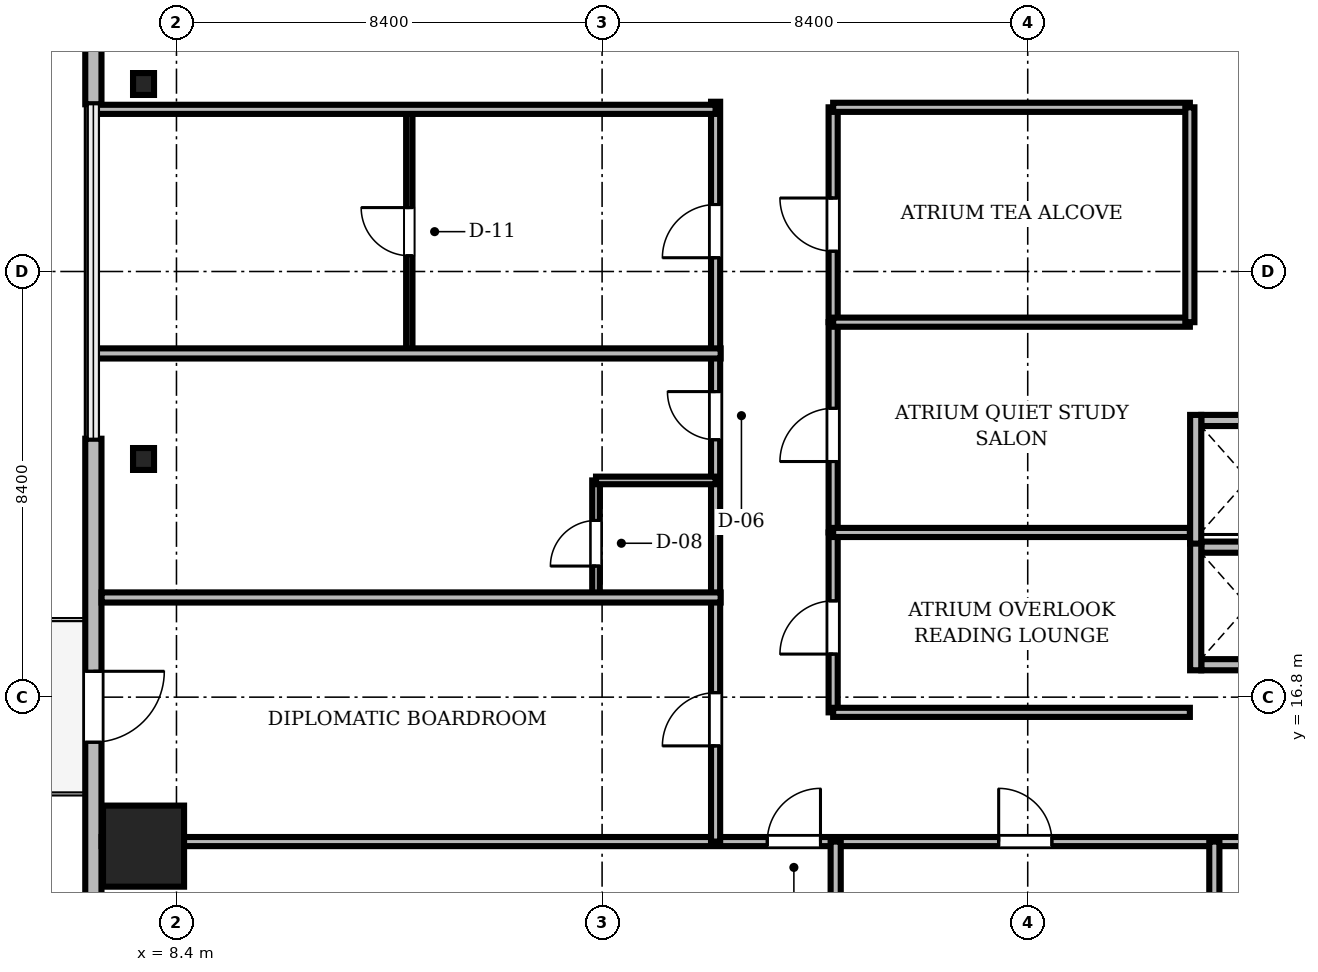
"""IFC4 building model, lengths in metres.
Left out: names, types, materials, properties, quantities, classifications, styles, units other than length and angle.
Written with IfcOpenShell. Run it as: python <this file> out.ifc"""

import sys

from ifc_helpers import new_model, si_unit, direction, frame, frame_2d, origin, origin_2d, place, context, subcontext, project, spatial, rectangle, i_section, extrude, source, transform, mapped, element, fill, save


model = new_model("IFC4")
c1 = context("Model", 3, precision=1e-05, world=origin(), true_north=direction((0.0, 1.0)))
c2 = subcontext(c1, "Body", "Model", "MODEL_VIEW")
j1 = project(units=[si_unit("LENGTHUNIT", "METRE"), si_unit("PLANEANGLEUNIT", "RADIAN")], contexts=[c1])
p1 = place(None, origin())
s1 = spatial("IfcSite", under=j1, at=p1, CompositionType="ELEMENT")
p2 = place(p1, origin())
s2 = spatial("IfcBuilding", under=s1, at=p2, CompositionType="ELEMENT")
p3 = place(p2, frame((0.0, 0.0, 115.0)))
s3 = spatial("IfcBuildingStorey", under=s2, at=p3, CompositionType="ELEMENT", Elevation=115.0)
m1 = source(origin(), c2, "Body", "SweptSolid", [
    extrude(rectangle(XDim=1.6, YDim=1.6, at=origin_2d()), origin(), (0.0, 0.0, 1.0), 3.46),
])
p4 = place(p3, frame((7.75, 13.86, 0.0), z_axis=(0.0, 0.0, 1.0), x_axis=(1.0, 0.0, 0.0)))
e1 = element("IfcColumn", 1, at=p4, inside=s3, PredefinedType="COLUMN", context=c2, shape_type="MappedRepresentation", body=[
    mapped(m1, transform((0.0, 0.0, 0.0), scale=1.0)),
])
m2 = source(origin(), c2, "Body", "SweptSolid", [
    extrude(i_section(OverallWidth=0.414, OverallDepth=0.432, WebThickness=0.026, FlangeThickness=0.04, FilletRadius=0.015, at=origin_2d()), origin(), (0.0, 0.0, 1.0), 3.46),
])
for number, where, z_axis, x_axis in (
    (2, (7.75, 28.9, 0.0), (0.0, 0.0, 1.0), (1.0, 0.0, 0.0)),
    (3, (7.75, 21.5, 0.0), (0.0, 0.0, 1.0), (1.0, 0.0, 0.0)),
):
    element("IfcColumn", number, at=place(p3, frame(where, z_axis=z_axis, x_axis=x_axis)), inside=s3, PredefinedType="COLUMN", context=c2, shape_type="MappedRepresentation", body=[
        mapped(m2, transform((0.0, 0.0, 0.0), scale=1.0)),
    ])
m3 = source(origin(), c2, "Body", "SweptSolid", [
    extrude(rectangle(XDim=15.6, YDim=0.32, at=frame_2d((7.8, 0.0))), origin(), (0.0, 0.0, 1.0), 3.46),
])
p5 = place(p3, frame((6.76, 44.1, 0.0), z_axis=(0.0, 0.0, 1.0), x_axis=(0.0, -1.0, 0.0)))
e4 = element("IfcWall", 4, at=p5, inside=s3, PredefinedType="SOLIDWALL", context=c2, shape_type="MappedRepresentation", body=[
    mapped(m3, transform((0.0, 0.0, 0.0), scale=1.0)),
])
m4 = source(origin(), c2, "Body", "SweptSolid", [
    extrude(rectangle(XDim=2.2, YDim=2.4, at=frame_2d((1.1, 1.2))), frame((0.0, 0.17, 0.0), z_axis=(0.0, -1.0, 0.0), x_axis=(1.0, 0.0, 0.0)), (0.0, 0.0, 1.0), 0.34),
])
p6 = place(p5, frame((3.005, 0.0, 0.72)))
e5 = element("IfcOpeningElement", 5, at=p6, cuts=e4, PredefinedType="OPENING", context=c2, shape_type="MappedRepresentation", body=[
    mapped(m4, transform((0.0, 0.0, 0.0), scale=1.0)),
])
m5 = source(origin(), c2, "Body", "SweptSolid", [
    extrude(rectangle(XDim=15.6, YDim=0.32, at=frame_2d((7.8, 0.0))), origin(), (0.0, 0.0, 1.0), 3.46),
])
p7 = place(p3, frame((6.76, 21.9, 0.0), z_axis=(0.0, 0.0, 1.0), x_axis=(0.0, -1.0, 0.0)))
e6 = element("IfcWall", 6, at=p7, inside=s3, PredefinedType="SOLIDWALL", context=c2, shape_type="MappedRepresentation", body=[
    mapped(m5, transform((0.0, 0.0, 0.0), scale=1.0)),
])
m6 = source(origin(), c2, "Body", "SweptSolid", [
    extrude(rectangle(XDim=1.4, YDim=2.3, at=frame_2d((0.7, 1.15))), frame((0.0, 0.17, 0.0), z_axis=(0.0, -1.0, 0.0), x_axis=(1.0, 0.0, 0.0)), (0.0, 0.0, 1.0), 0.34),
])
p8 = place(p7, frame((4.59, 0.0, 0.0)))
e7 = element("IfcOpeningElement", 7, at=p8, cuts=e6, PredefinedType="OPENING", context=c2, shape_type="MappedRepresentation", body=[
    mapped(m6, transform((0.0, 0.0, 0.0), scale=1.0)),
])
p9 = place(p7, frame((10.395, 0.0, 0.72)))
e8 = element("IfcOpeningElement", 8, at=p9, cuts=e6, PredefinedType="OPENING", context=c2, shape_type="MappedRepresentation", body=[
    mapped(m4, transform((0.0, 0.0, 0.0), scale=1.0)),
])
m7 = source(origin(), c2, "Body", "SweptSolid", [
    extrude(rectangle(XDim=1.85, YDim=0.22, at=frame_2d((0.925, 0.0))), origin(), (0.0, 0.0, 1.0), 3.46),
])
for number, where, z_axis, x_axis in (
    (9, (28.625, 17.44, 0.0), (0.0, 0.0, 1.0), (1.0, 0.0, 0.0)),
    (10, (28.625, 19.76, 0.0), (0.0, 0.0, 1.0), (1.0, 0.0, 0.0)),
):
    element("IfcWall", number, at=place(p3, frame(where, z_axis=z_axis, x_axis=x_axis)), inside=s3, PredefinedType="SOLIDWALL", context=c2, shape_type="MappedRepresentation", body=[
        mapped(m7, transform((0.0, 0.0, 0.0), scale=1.0)),
    ])
m8 = source(origin(), c2, "Body", "SweptSolid", [
    extrude(rectangle(XDim=2.54, YDim=0.22, at=frame_2d((1.27, 0.0))), origin(), (0.0, 0.0, 1.0), 3.46),
])
p10 = place(p3, frame((28.515, 17.33, 0.0), z_axis=(0.0, 0.0, 1.0), x_axis=(0.0, 1.0, 0.0)))
e11 = element("IfcWall", 11, at=p10, inside=s3, PredefinedType="SOLIDWALL", context=c2, shape_type="MappedRepresentation", body=[
    mapped(m8, transform((0.0, 0.0, 0.0), scale=1.0)),
])
p11 = place(p3, frame((28.625, 22.26, 0.0), z_axis=(0.0, 0.0, 1.0), x_axis=(1.0, 0.0, 0.0)))
e12 = element("IfcWall", 12, at=p11, inside=s3, PredefinedType="SOLIDWALL", context=c2, shape_type="MappedRepresentation", body=[
    mapped(m7, transform((0.0, 0.0, 0.0), scale=1.0)),
])
p12 = place(p3, frame((28.515, 19.83, 0.0), z_axis=(0.0, 0.0, 1.0), x_axis=(0.0, 1.0, 0.0)))
e13 = element("IfcWall", 13, at=p12, inside=s3, PredefinedType="SOLIDWALL", context=c2, shape_type="MappedRepresentation", body=[
    mapped(m8, transform((0.0, 0.0, 0.0), scale=1.0)),
])
m9 = source(origin(), c2, "Body", "SweptSolid", [
    extrude(rectangle(XDim=46.156, YDim=0.18, at=frame_2d((23.078, 0.0))), origin(), (0.0, 0.0, 1.0), 2.702),
])
p13 = place(p3, frame((6.922, 13.95, 0.0), z_axis=(0.0, 0.0, 1.0), x_axis=(1.0, 0.0, 0.0)))
e14 = element("IfcWall", 14, at=p13, inside=s3, PredefinedType="PARTITIONING", context=c2, shape_type="MappedRepresentation", body=[
    mapped(m9, transform((0.0, 0.0, 0.0), scale=1.0)),
])
m10 = source(origin(), c2, "Body", "SweptSolid", [
    extrude(rectangle(XDim=1.05, YDim=2.2, at=frame_2d((0.525, 1.1))), frame((0.0, 0.1, 0.0), z_axis=(0.0, -1.0, 0.0), x_axis=(1.0, 0.0, 0.0)), (0.0, 0.0, 1.0), 0.2),
])
p14 = place(p13, frame((13.138, 0.0, 0.0)))
e15 = element("IfcOpeningElement", 15, at=p14, cuts=e14, PredefinedType="OPENING", context=c2, shape_type="MappedRepresentation", body=[
    mapped(m10, transform((0.0, 0.0, 0.0), scale=1.0)),
])
p15 = place(p13, frame((17.705, 0.0, 0.0)))
e16 = element("IfcOpeningElement", 16, at=p15, cuts=e14, PredefinedType="OPENING", context=c2, shape_type="MappedRepresentation", body=[
    mapped(m10, transform((0.0, 0.0, 0.0), scale=1.0)),
])
p16 = place(p13, frame((25.178, 0.0, 0.0)))
e17 = element("IfcOpeningElement", 17, at=p16, cuts=e14, PredefinedType="OPENING", context=c2, shape_type="MappedRepresentation", body=[
    mapped(m10, transform((0.0, 0.0, 0.0), scale=1.0)),
])
p17 = place(p13, frame((32.651, 0.0, 0.0)))
e18 = element("IfcOpeningElement", 18, at=p17, cuts=e14, PredefinedType="OPENING", context=c2, shape_type="MappedRepresentation", body=[
    mapped(m10, transform((0.0, 0.0, 0.0), scale=1.0)),
])
p18 = place(p13, frame((40.998, 0.0, 0.0)))
e19 = element("IfcOpeningElement", 19, at=p18, cuts=e14, PredefinedType="OPENING", context=c2, shape_type="MappedRepresentation", body=[
    mapped(m10, transform((0.0, 0.0, 0.0), scale=1.0)),
])
m11 = source(origin(), c2, "Body", "SweptSolid", [
    extrude(rectangle(XDim=14.6, YDim=0.18, at=frame_2d((7.3, 0.0))), origin(), (0.0, 0.0, 1.0), 2.852),
])
p19 = place(p3, frame((19.04, 13.95, 0.0), z_axis=(0.0, 0.0, 1.0), x_axis=(0.0, 1.0, 0.0)))
e20 = element("IfcWall", 20, at=p19, inside=s3, PredefinedType="PARTITIONING", context=c2, shape_type="MappedRepresentation", body=[
    mapped(m11, transform((0.0, 0.0, 0.0), scale=1.0)),
])
p20 = place(p19, frame((1.888, 0.0, 0.0)))
e21 = element("IfcOpeningElement", 21, at=p20, cuts=e20, PredefinedType="OPENING", context=c2, shape_type="MappedRepresentation", body=[
    mapped(m10, transform((0.0, 0.0, 0.0), scale=1.0)),
])
m12 = source(origin(), c2, "Body", "SweptSolid", [
    extrude(rectangle(XDim=0.95, YDim=2.15, at=frame_2d((0.475, 1.075))), frame((0.0, 0.1, 0.0), z_axis=(0.0, -1.0, 0.0), x_axis=(1.0, 0.0, 0.0)), (0.0, 0.0, 1.0), 0.2),
])
p21 = place(p19, frame((7.93, 0.0, 0.0)))
e22 = element("IfcOpeningElement", 22, at=p21, cuts=e20, PredefinedType="OPENING", context=c2, shape_type="MappedRepresentation", body=[
    mapped(m12, transform((0.0, 0.0, 0.0), scale=1.0)),
])
p22 = place(p19, frame((11.522, 0.0, 0.0)))
e23 = element("IfcOpeningElement", 23, at=p22, cuts=e20, PredefinedType="OPENING", context=c2, shape_type="MappedRepresentation", body=[
    mapped(m10, transform((0.0, 0.0, 0.0), scale=1.0)),
])
m13 = source(origin(), c2, "Body", "SweptSolid", [
    extrude(rectangle(XDim=4.817, YDim=0.125, at=frame_2d((2.408, 0.0))), origin(), (0.0, 0.0, 1.0), 2.852),
])
p23 = place(p3, frame((12.995, 23.583, 0.0), z_axis=(0.0, 0.0, 1.0), x_axis=(0.0, 1.0, 0.0)))
e24 = element("IfcWall", 24, at=p23, inside=s3, PredefinedType="PARTITIONING", context=c2, shape_type="MappedRepresentation", body=[
    mapped(m13, transform((0.0, 0.0, 0.0), scale=1.0)),
])
m14 = source(origin(), c2, "Body", "SweptSolid", [
    extrude(rectangle(XDim=0.95, YDim=2.15, at=frame_2d((0.475, 1.075))), frame((0.0, 0.073, 0.0), z_axis=(0.0, -1.0, 0.0), x_axis=(1.0, 0.0, 0.0)), (0.0, 0.0, 1.0), 0.145),
])
p24 = place(p23, frame((1.928, 0.0, 0.0)))
e25 = element("IfcOpeningElement", 25, at=p24, cuts=e24, PredefinedType="OPENING", context=c2, shape_type="MappedRepresentation", body=[
    mapped(m14, transform((0.0, 0.0, 0.0), scale=1.0)),
])
m15 = source(origin(), c2, "Body", "SweptSolid", [
    extrude(rectangle(XDim=4.24, YDim=0.18, at=frame_2d((2.12, 0.0))), origin(), (0.0, 0.0, 1.0), 2.852),
])
p25 = place(p3, frame((21.36, 24.2, 0.0), z_axis=(0.0, 0.0, 1.0), x_axis=(0.0, 1.0, 0.0)))
e26 = element("IfcWall", 26, at=p25, inside=s3, PredefinedType="PARTITIONING", context=c2, shape_type="MappedRepresentation", body=[
    mapped(m15, transform((0.0, 0.0, 0.0), scale=1.0)),
])
p26 = place(p25, frame((1.4, 0.0, 0.0)))
e27 = element("IfcOpeningElement", 27, at=p26, cuts=e26, PredefinedType="OPENING", context=c2, shape_type="MappedRepresentation", body=[
    mapped(m10, transform((0.0, 0.0, 0.0), scale=1.0)),
])
m16 = source(origin(), c2, "Body", "SweptSolid", [
    extrude(rectangle(XDim=4.15, YDim=0.18, at=frame_2d((2.075, 0.0))), origin(), (0.0, 0.0, 1.0), 3.122),
])
p27 = place(p3, frame((21.36, 20.05, 0.0), z_axis=(0.0, 0.0, 1.0), x_axis=(0.0, 1.0, 0.0)))
e28 = element("IfcWall", 28, at=p27, inside=s3, PredefinedType="PARTITIONING", context=c2, shape_type="MappedRepresentation", body=[
    mapped(m16, transform((0.0, 0.0, 0.0), scale=1.0)),
])
p28 = place(p27, frame((1.4, 0.0, 0.0)))
e29 = element("IfcOpeningElement", 29, at=p28, cuts=e28, PredefinedType="OPENING", context=c2, shape_type="MappedRepresentation", body=[
    mapped(m10, transform((0.0, 0.0, 0.0), scale=1.0)),
])
m17 = source(origin(), c2, "Body", "SweptSolid", [
    extrude(rectangle(XDim=3.55, YDim=0.18, at=frame_2d((1.775, 0.0))), origin(), (0.0, 0.0, 1.0), 2.852),
])
p29 = place(p3, frame((21.36, 16.5, 0.0), z_axis=(0.0, 0.0, 1.0), x_axis=(0.0, 1.0, 0.0)))
e30 = element("IfcWall", 30, at=p29, inside=s3, PredefinedType="PARTITIONING", context=c2, shape_type="MappedRepresentation", body=[
    mapped(m17, transform((0.0, 0.0, 0.0), scale=1.0)),
])
p30 = place(p29, frame((1.15, 0.0, 0.0)))
e31 = element("IfcOpeningElement", 31, at=p30, cuts=e30, PredefinedType="OPENING", context=c2, shape_type="MappedRepresentation", body=[
    mapped(m10, transform((0.0, 0.0, 0.0), scale=1.0)),
])
m18 = source(origin(), c2, "Body", "SweptSolid", [
    extrude(rectangle(XDim=2.29, YDim=0.15, at=frame_2d((1.145, 0.0))), origin(), (0.0, 0.0, 1.0), 2.852),
])
p31 = place(p3, frame((16.68, 18.787, 0.0), z_axis=(0.0, 0.0, 1.0), x_axis=(0.0, 1.0, 0.0)))
e32 = element("IfcWall", 32, at=p31, inside=s3, PredefinedType="PARTITIONING", context=c2, shape_type="MappedRepresentation", body=[
    mapped(m18, transform((0.0, 0.0, 0.0), scale=1.0)),
])
m19 = source(origin(), c2, "Body", "SweptSolid", [
    extrude(rectangle(XDim=0.9, YDim=2.1, at=frame_2d((0.45, 1.05))), frame((0.0, 0.085, 0.0), z_axis=(0.0, -1.0, 0.0), x_axis=(1.0, 0.0, 0.0)), (0.0, 0.0, 1.0), 0.17),
])
p32 = place(p31, frame((0.6, 0.0, 0.0)))
e33 = element("IfcOpeningElement", 33, at=p32, cuts=e32, PredefinedType="OPENING", context=c2, shape_type="MappedRepresentation", body=[
    mapped(m19, transform((0.0, 0.0, 0.0), scale=1.0)),
])
m20 = source(origin(), c2, "Body", "SweptSolid", [
    extrude(rectangle(XDim=12.218, YDim=0.2, at=frame_2d((6.109, 0.0))), origin(), (0.0, 0.0, 1.0), 2.702),
])
p33 = place(p3, frame((6.922, 18.767, 0.0), z_axis=(0.0, 0.0, 1.0), x_axis=(1.0, 0.0, 0.0)))
e34 = element("IfcWall", 34, at=p33, inside=s3, PredefinedType="PARTITIONING", context=c2, shape_type="MappedRepresentation", body=[
    mapped(m20, transform((0.0, 0.0, 0.0), scale=1.0)),
])
m21 = source(origin(), c2, "Body", "SweptSolid", [
    extrude(rectangle(XDim=12.41, YDim=0.2, at=frame_2d((6.205, 0.0))), origin(), (0.0, 0.0, 1.0), 2.702),
])
p34 = place(p3, frame((6.73, 23.583, 0.0), z_axis=(0.0, 0.0, 1.0), x_axis=(1.0, 0.0, 0.0)))
e35 = element("IfcWall", 35, at=p34, inside=s3, PredefinedType="PARTITIONING", context=c2, shape_type="MappedRepresentation", body=[
    mapped(m21, transform((0.0, 0.0, 0.0), scale=1.0)),
])
m22 = source(origin(), c2, "Body", "SweptSolid", [
    extrude(rectangle(XDim=12.31, YDim=0.18, at=frame_2d((6.155, 0.0))), origin(), (0.0, 0.0, 1.0), 2.702),
])
p35 = place(p3, frame((6.73, 28.4, 0.0), z_axis=(0.0, 0.0, 1.0), x_axis=(1.0, 0.0, 0.0)))
e36 = element("IfcWall", 36, at=p35, inside=s3, PredefinedType="PARTITIONING", context=c2, shape_type="MappedRepresentation", body=[
    mapped(m22, transform((0.0, 0.0, 0.0), scale=1.0)),
])
m23 = source(origin(), c2, "Body", "SweptSolid", [
    extrude(rectangle(XDim=11.828, YDim=0.2, at=frame_2d((5.914, 0.0))), origin(), (0.0, 0.0, 1.0), 2.702),
])
p36 = place(p3, frame((21.41, 2.122, 0.0), z_axis=(0.0, 0.0, 1.0), x_axis=(0.0, 1.0, 0.0)))
e37 = element("IfcWall", 37, at=p36, inside=s3, PredefinedType="PARTITIONING", context=c2, shape_type="MappedRepresentation", body=[
    mapped(m23, transform((0.0, 0.0, 0.0), scale=1.0)),
])
m24 = source(origin(), c2, "Body", "SweptSolid", [
    extrude(rectangle(XDim=12.02, YDim=0.2, at=frame_2d((6.01, 0.0))), origin(), (0.0, 0.0, 1.0), 2.702),
])
p37 = place(p3, frame((28.883, 1.93, 0.0), z_axis=(0.0, 0.0, 1.0), x_axis=(0.0, 1.0, 0.0)))
e38 = element("IfcWall", 38, at=p37, inside=s3, PredefinedType="PARTITIONING", context=c2, shape_type="MappedRepresentation", body=[
    mapped(m24, transform((0.0, 0.0, 0.0), scale=1.0)),
])
m25 = source(origin(), c2, "Body", "SweptSolid", [
    extrude(rectangle(XDim=7.04, YDim=0.18, at=frame_2d((3.52, 0.0))), origin(), (0.0, 0.0, 1.0), 3.46),
])
for number, where, z_axis, x_axis in (
    (39, (21.36, 16.5, 0.0), (0.0, 0.0, 1.0), (1.0, 0.0, 0.0)),
    (40, (21.36, 20.05, 0.0), (0.0, 0.0, 1.0), (1.0, 0.0, 0.0)),
    (41, (21.36, 24.2, 0.0), (0.0, 0.0, 1.0), (1.0, 0.0, 0.0)),
    (42, (21.36, 28.44, 0.0), (0.0, 0.0, 1.0), (1.0, 0.0, 0.0)),
):
    element("IfcWall", number, at=place(p3, frame(where, z_axis=z_axis, x_axis=x_axis)), inside=s3, PredefinedType="PARTITIONING", context=c2, shape_type="MappedRepresentation", body=[
        mapped(m25, transform((0.0, 0.0, 0.0), scale=1.0)),
    ])
p38 = place(p3, frame((28.4, 24.2, 0.0), z_axis=(0.0, 0.0, 1.0), x_axis=(0.0, 1.0, 0.0)))
e43 = element("IfcWall", 43, at=p38, inside=s3, PredefinedType="PARTITIONING", context=c2, shape_type="MappedRepresentation", body=[
    mapped(m15, transform((0.0, 0.0, 0.0), scale=1.0)),
])
m26 = source(origin(), c2, "Body", "SweptSolid", [
    extrude(rectangle(XDim=2.36, YDim=0.15, at=frame_2d((1.18, 0.0))), origin(), (0.0, 0.0, 1.0), 3.46),
])
p39 = place(p3, frame((16.68, 21.077, 0.0), z_axis=(0.0, 0.0, 1.0), x_axis=(1.0, 0.0, 0.0)))
e44 = element("IfcWall", 44, at=p39, inside=s3, PredefinedType="PARTITIONING", context=c2, shape_type="MappedRepresentation", body=[
    mapped(m26, transform((0.0, 0.0, 0.0), scale=1.0)),
])
m27 = source(origin(), c2, "Body", "SweptSolid", [
    extrude(rectangle(XDim=1.4, YDim=2.3, at=frame_2d((0.7, 1.15))), frame((0.0, 0.025, 0.0), z_axis=(0.0, -1.0, 0.0), x_axis=(1.0, 0.0, 0.0)), (0.0, 0.0, 1.0), 0.05),
])
p40 = place(p8, frame((1.4, 0.0, 0.0), z_axis=(0.0, 0.0, 1.0), x_axis=(-1.0, 0.0, 0.0)))
e45 = element("IfcDoor", 45, at=p40, inside=s3, OperationType="DOUBLE_DOOR_SLIDING", PredefinedType="DOOR", context=c2, shape_type="MappedRepresentation", body=[
    mapped(m27, transform((0.0, 0.0, 0.0), scale=1.0)),
])
fill(e7, e45)
m28 = source(origin(), c2, "Body", "SweptSolid", [
    extrude(rectangle(XDim=1.05, YDim=2.2, at=frame_2d((0.525, 1.1))), frame((0.0, 0.025, 0.0), z_axis=(0.0, -1.0, 0.0), x_axis=(1.0, 0.0, 0.0)), (0.0, 0.0, 1.0), 0.05),
])
p41 = place(p14, origin())
e46 = element("IfcDoor", 46, at=p41, inside=s3, OperationType="SINGLE_SWING_RIGHT", PredefinedType="DOOR", context=c2, shape_type="MappedRepresentation", body=[
    mapped(m28, transform((0.0, 0.0, 0.0), scale=1.0)),
])
fill(e15, e46)
p42 = place(p15, origin())
e47 = element("IfcDoor", 47, at=p42, inside=s3, OperationType="SINGLE_SWING_LEFT", PredefinedType="DOOR", context=c2, shape_type="MappedRepresentation", body=[
    mapped(m28, transform((0.0, 0.0, 0.0), scale=1.0)),
])
fill(e16, e47)
p43 = place(p20, origin())
e48 = element("IfcDoor", 48, at=p43, inside=s3, OperationType="SINGLE_SWING_LEFT", PredefinedType="DOOR", context=c2, shape_type="MappedRepresentation", body=[
    mapped(m28, transform((0.0, 0.0, 0.0), scale=1.0)),
])
fill(e21, e48)
m29 = source(origin(), c2, "Body", "SweptSolid", [
    extrude(rectangle(XDim=0.95, YDim=2.15, at=frame_2d((0.475, 1.075))), frame((0.0, 0.025, 0.0), z_axis=(0.0, -1.0, 0.0), x_axis=(1.0, 0.0, 0.0)), (0.0, 0.0, 1.0), 0.05),
])
p44 = place(p21, origin())
e49 = element("IfcDoor", 49, at=p44, inside=s3, OperationType="SINGLE_SWING_RIGHT", PredefinedType="DOOR", context=c2, shape_type="MappedRepresentation", body=[
    mapped(m29, transform((0.0, 0.0, 0.0), scale=1.0)),
])
fill(e22, e49)
p45 = place(p22, origin())
e50 = element("IfcDoor", 50, at=p45, inside=s3, OperationType="SINGLE_SWING_LEFT", PredefinedType="DOOR", context=c2, shape_type="MappedRepresentation", body=[
    mapped(m28, transform((0.0, 0.0, 0.0), scale=1.0)),
])
fill(e23, e50)
p46 = place(p24, origin())
e51 = element("IfcDoor", 51, at=p46, inside=s3, OperationType="SINGLE_SWING_RIGHT", PredefinedType="DOOR", context=c2, shape_type="MappedRepresentation", body=[
    mapped(m29, transform((0.0, 0.0, 0.0), scale=1.0)),
])
fill(e25, e51)
p47 = place(p26, origin())
e52 = element("IfcDoor", 52, at=p47, inside=s3, OperationType="SINGLE_SWING_RIGHT", PredefinedType="DOOR", context=c2, shape_type="MappedRepresentation", body=[
    mapped(m28, transform((0.0, 0.0, 0.0), scale=1.0)),
])
fill(e27, e52)
p48 = place(p28, origin())
e53 = element("IfcDoor", 53, at=p48, inside=s3, OperationType="SINGLE_SWING_LEFT", PredefinedType="DOOR", context=c2, shape_type="MappedRepresentation", body=[
    mapped(m28, transform((0.0, 0.0, 0.0), scale=1.0)),
])
fill(e29, e53)
p49 = place(p30, origin())
e54 = element("IfcDoor", 54, at=p49, inside=s3, OperationType="SINGLE_SWING_LEFT", PredefinedType="DOOR", context=c2, shape_type="MappedRepresentation", body=[
    mapped(m28, transform((0.0, 0.0, 0.0), scale=1.0)),
])
fill(e31, e54)
m30 = source(origin(), c2, "Body", "SweptSolid", [
    extrude(rectangle(XDim=0.9, YDim=2.1, at=frame_2d((0.45, 1.05))), frame((0.0, 0.025, 0.0), z_axis=(0.0, -1.0, 0.0), x_axis=(1.0, 0.0, 0.0)), (0.0, 0.0, 1.0), 0.05),
])
p50 = place(p32, origin())
e55 = element("IfcDoor", 55, at=p50, inside=s3, OperationType="SINGLE_SWING_LEFT", PredefinedType="DOOR", context=c2, shape_type="MappedRepresentation", body=[
    mapped(m30, transform((0.0, 0.0, 0.0), scale=1.0)),
])
fill(e33, e55)
save(model, sys.argv[1])
